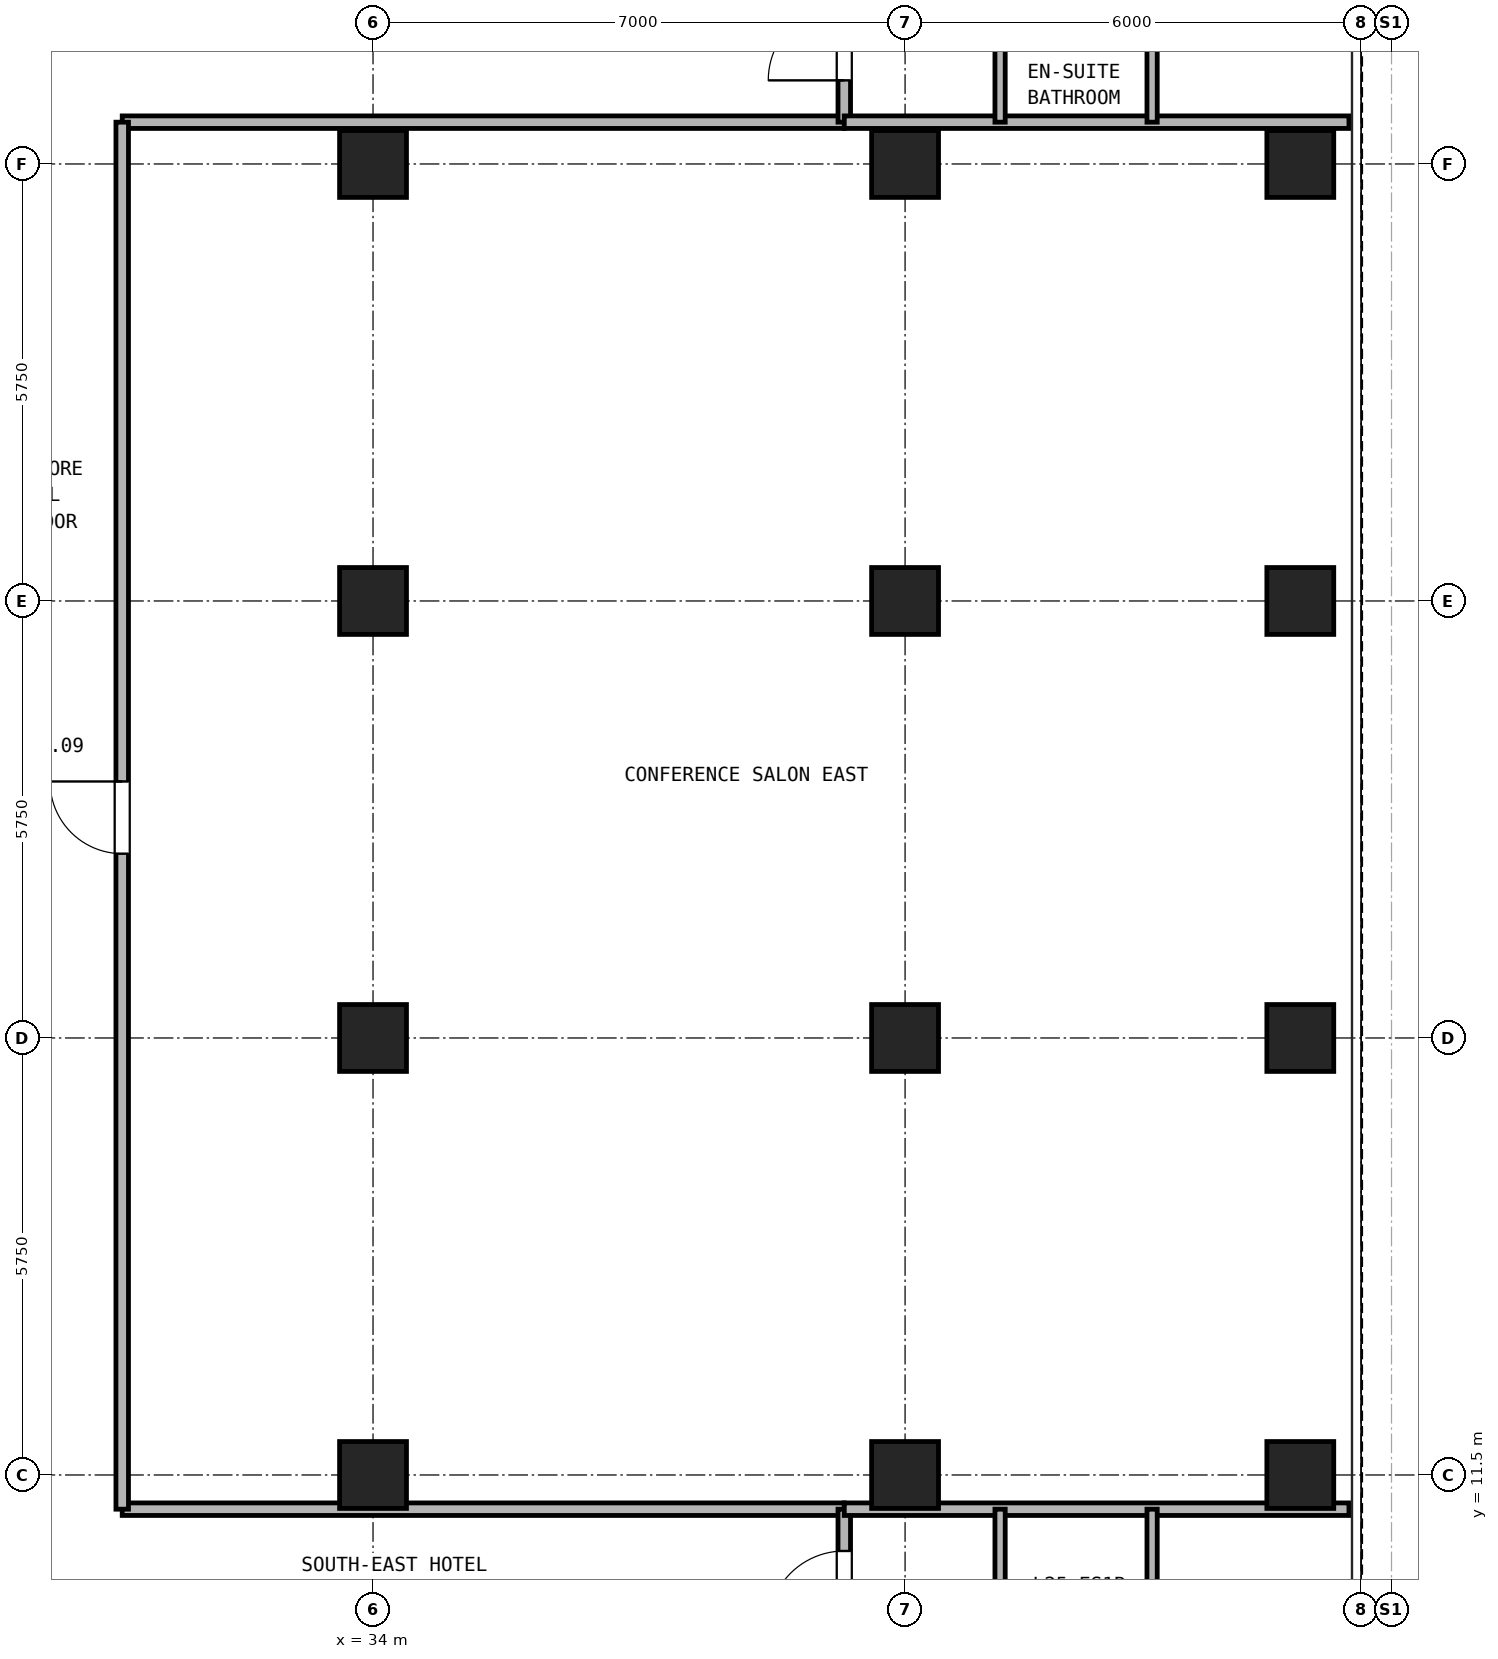
"""IFC4 building model, lengths in metres.
Left out: names, types, materials, properties, quantities, classifications, styles, units other than length and angle.
Written with IfcOpenShell. Run it as: python <this file> out.ifc"""

import sys

from ifc_helpers import new_model, si_unit, direction, frame, frame_2d, origin, origin_2d, place, context, subcontext, project, spatial, rectangle, hollow_rectangle, extrude, source, transform, mapped, element, fill, save


model = new_model("IFC4")
c1 = context("Model", 3, precision=1e-05, world=origin(), true_north=direction((0.0, 1.0)))
c2 = subcontext(c1, "Body", "Model", "MODEL_VIEW")
j1 = project(units=[si_unit("LENGTHUNIT", "METRE"), si_unit("PLANEANGLEUNIT", "RADIAN")], contexts=[c1])
p1 = place(None, origin())
s1 = spatial("IfcSite", under=j1, at=p1, CompositionType="ELEMENT")
p2 = place(p1, origin())
s2 = spatial("IfcBuilding", under=s1, at=p2, CompositionType="ELEMENT")
p3 = place(p2, frame((0.0, 0.0, 95.9)))
s3 = spatial("IfcBuildingStorey", under=s2, at=p3, CompositionType="ELEMENT", Elevation=95.9)
m1 = source(origin(), c2, "Body", "SweptSolid", [
    extrude(hollow_rectangle(XDim=0.88, YDim=0.88, WallThickness=0.05, at=origin_2d()), origin(), (0.0, 0.0, 1.0), 2.95),
])
for number, where, z_axis, x_axis in (
    (1, (46.2, 11.5, 0.0), (0.0, 0.0, 1.0), (1.0, 0.0, 0.0)),
    (2, (46.2, 17.25, 0.0), (0.0, 0.0, 1.0), (1.0, 0.0, 0.0)),
    (3, (46.2, 23.0, 0.0), (0.0, 0.0, 1.0), (1.0, 0.0, 0.0)),
    (4, (46.2, 28.75, 0.0), (0.0, 0.0, 1.0), (1.0, 0.0, 0.0)),
    (5, (34.0, 11.5, 0.0), (0.0, 0.0, 1.0), (1.0, 0.0, 0.0)),
    (6, (34.0, 17.25, 0.0), (0.0, 0.0, 1.0), (1.0, 0.0, 0.0)),
    (7, (34.0, 23.0, 0.0), (0.0, 0.0, 1.0), (1.0, 0.0, 0.0)),
    (8, (34.0, 28.75, 0.0), (0.0, 0.0, 1.0), (1.0, 0.0, 0.0)),
    (9, (41.0, 11.5, 0.0), (0.0, 0.0, 1.0), (1.0, 0.0, 0.0)),
    (10, (41.0, 17.25, 0.0), (0.0, 0.0, 1.0), (1.0, 0.0, 0.0)),
    (11, (41.0, 23.0, 0.0), (0.0, 0.0, 1.0), (1.0, 0.0, 0.0)),
    (12, (41.0, 28.75, 0.0), (0.0, 0.0, 1.0), (1.0, 0.0, 0.0)),
):
    element("IfcColumn", number, at=place(p3, frame(where, z_axis=z_axis, x_axis=x_axis)), inside=s3, PredefinedType="COLUMN", context=c2, shape_type="MappedRepresentation", body=[
        mapped(m1, transform((0.0, 0.0, 0.0), x_axis=(1.0, 0.0, 0.0), y_axis=(0.0, 1.0, 0.0), z_axis=(0.0, 0.0, 1.0), scale=1.0)),
    ])
for number, where, z_axis, x_axis in (
    (13, (30.7, 11.05, 0.0), (0.0, 0.0, 1.0), (1.0, 0.0, 0.0)),
    (14, (30.7, 29.3, 0.0), (0.0, 0.0, 1.0), (1.0, 0.0, 0.0)),
):
    element("IfcWall", number, at=place(p3, frame(where, z_axis=z_axis, x_axis=x_axis)), inside=s3, PredefinedType="PARTITIONING", context=c2, shape_type="SweptSolid", body=[
        extrude(rectangle(XDim=9.5, YDim=0.165, at=frame_2d((4.75, 0.0))), origin(), (0.0, 0.0, 1.0), 2.95),
    ])
p4 = place(p3, frame((30.7, 11.05, 0.0), z_axis=(0.0, 0.0, 1.0), x_axis=(0.0, 1.0, 0.0)))
e15 = element("IfcWall", 15, at=p4, inside=s3, PredefinedType="PARTITIONING", context=c2, shape_type="SweptSolid", body=[
    extrude(rectangle(XDim=18.25, YDim=0.165, at=frame_2d((9.125, 0.0))), origin(), (0.0, 0.0, 1.0), 2.95),
])
p5 = place(p4, frame((8.625, 0.0, 0.0)))
e16 = element("IfcOpeningElement", 16, at=p5, cuts=e15, PredefinedType="OPENING", context=c2, shape_type="SweptSolid", body=[
    extrude(rectangle(XDim=0.95, YDim=2.15, at=frame_2d((0.475, 1.075))), frame((0.0, 0.093, 0.0), z_axis=(0.0, -1.0, 0.0), x_axis=(1.0, 0.0, 0.0)), (0.0, 0.0, 1.0), 0.185),
])
p6 = place(p3, frame((40.2, 0.16, 0.0), z_axis=(0.0, 0.0, 1.0), x_axis=(0.0, 1.0, 0.0)))
e17 = element("IfcWall", 17, at=p6, inside=s3, PredefinedType="PARTITIONING", context=c2, shape_type="SweptSolid", body=[
    extrude(rectangle(XDim=10.89, YDim=0.165, at=frame_2d((5.445, 0.0))), origin(), (0.0, 0.0, 1.0), 2.95),
])
p7 = place(p6, frame((9.34, 0.0, 0.0)))
e18 = element("IfcOpeningElement", 18, at=p7, cuts=e17, PredefinedType="OPENING", context=c2, shape_type="SweptSolid", body=[
    extrude(rectangle(XDim=1.0, YDim=2.15, at=frame_2d((0.5, 1.075))), frame((0.0, 0.093, 0.0), z_axis=(0.0, -1.0, 0.0), x_axis=(1.0, 0.0, 0.0)), (0.0, 0.0, 1.0), 0.185),
])
p8 = place(p3, frame((40.2, 29.3, 0.0), z_axis=(0.0, 0.0, 1.0), x_axis=(0.0, 1.0, 0.0)))
e19 = element("IfcWall", 19, at=p8, inside=s3, PredefinedType="PARTITIONING", context=c2, shape_type="SweptSolid", body=[
    extrude(rectangle(XDim=5.84, YDim=0.165, at=frame_2d((2.92, 0.0))), origin(), (0.0, 0.0, 1.0), 2.95),
])
p9 = place(p8, frame((0.55, 0.0, 0.0)))
e20 = element("IfcOpeningElement", 20, at=p9, cuts=e19, PredefinedType="OPENING", context=c2, shape_type="SweptSolid", body=[
    extrude(rectangle(XDim=1.0, YDim=2.15, at=frame_2d((0.5, 1.075))), frame((0.0, 0.093, 0.0), z_axis=(0.0, -1.0, 0.0), x_axis=(1.0, 0.0, 0.0)), (0.0, 0.0, 1.0), 0.185),
])
for number, where, z_axis, x_axis in (
    (21, (40.2, 11.05, 0.0), (0.0, 0.0, 1.0), (1.0, 0.0, 0.0)),
    (22, (40.2, 29.3, 0.0), (0.0, 0.0, 1.0), (1.0, 0.0, 0.0)),
):
    element("IfcWall", number, at=place(p3, frame(where, z_axis=z_axis, x_axis=x_axis)), inside=s3, PredefinedType="PARTITIONING", context=c2, shape_type="SweptSolid", body=[
        extrude(rectangle(XDim=6.64, YDim=0.165, at=frame_2d((3.32, 0.0))), origin(), (0.0, 0.0, 1.0), 2.95),
    ])
for number, where, z_axis, x_axis in (
    (23, (42.25, 8.95, 0.0), (0.0, 0.0, 1.0), (0.0, 1.0, 0.0)),
    (24, (44.25, 8.95, 0.0), (0.0, 0.0, 1.0), (0.0, 1.0, 0.0)),
):
    element("IfcWall", number, at=place(p3, frame(where, z_axis=z_axis, x_axis=x_axis)), inside=s3, PredefinedType="PARTITIONING", context=c2, shape_type="SweptSolid", body=[
        extrude(rectangle(XDim=2.1, YDim=0.135, at=frame_2d((1.05, 0.0))), origin(), (0.0, 0.0, 1.0), 2.95),
    ])
for number, where, z_axis, x_axis in (
    (25, (42.25, 29.3, 0.0), (0.0, 0.0, 1.0), (0.0, 1.0, 0.0)),
    (26, (44.25, 29.3, 0.0), (0.0, 0.0, 1.0), (0.0, 1.0, 0.0)),
):
    element("IfcWall", number, at=place(p3, frame(where, z_axis=z_axis, x_axis=x_axis)), inside=s3, PredefinedType="PARTITIONING", context=c2, shape_type="SweptSolid", body=[
        extrude(rectangle(XDim=2.1, YDim=0.135, at=frame_2d((1.05, 0.0))), origin(), (0.0, 0.0, 1.0), 2.95),
    ])
p10 = place(p7, frame((1.0, 0.0, 0.0), z_axis=(0.0, 0.0, 1.0), x_axis=(-1.0, 0.0, 0.0)))
e27 = element("IfcDoor", 27, at=p10, inside=s3, OperationType="SINGLE_SWING_LEFT", PredefinedType="DOOR", context=c2, shape_type="SweptSolid", body=[
    extrude(rectangle(XDim=1.0, YDim=2.15, at=frame_2d((0.5, 1.075))), frame((0.0, 0.025, 0.0), z_axis=(0.0, -1.0, 0.0), x_axis=(1.0, 0.0, 0.0)), (0.0, 0.0, 1.0), 0.05),
])
fill(e18, e27)
p11 = place(p9, frame((1.0, 0.0, 0.0), z_axis=(0.0, 0.0, 1.0), x_axis=(-1.0, 0.0, 0.0)))
e28 = element("IfcDoor", 28, at=p11, inside=s3, OperationType="SINGLE_SWING_LEFT", PredefinedType="DOOR", context=c2, shape_type="SweptSolid", body=[
    extrude(rectangle(XDim=1.0, YDim=2.15, at=frame_2d((0.5, 1.075))), frame((0.0, 0.025, 0.0), z_axis=(0.0, -1.0, 0.0), x_axis=(1.0, 0.0, 0.0)), (0.0, 0.0, 1.0), 0.05),
])
fill(e20, e28)
p12 = place(p5, origin())
e29 = element("IfcDoor", 29, at=p12, inside=s3, OperationType="SINGLE_SWING_RIGHT", PredefinedType="DOOR", context=c2, shape_type="SweptSolid", body=[
    extrude(rectangle(XDim=0.95, YDim=2.15, at=frame_2d((0.475, 1.075))), frame((0.0, 0.025, 0.0), z_axis=(0.0, -1.0, 0.0), x_axis=(1.0, 0.0, 0.0)), (0.0, 0.0, 1.0), 0.05),
])
fill(e16, e29)
save(model, sys.argv[1])
